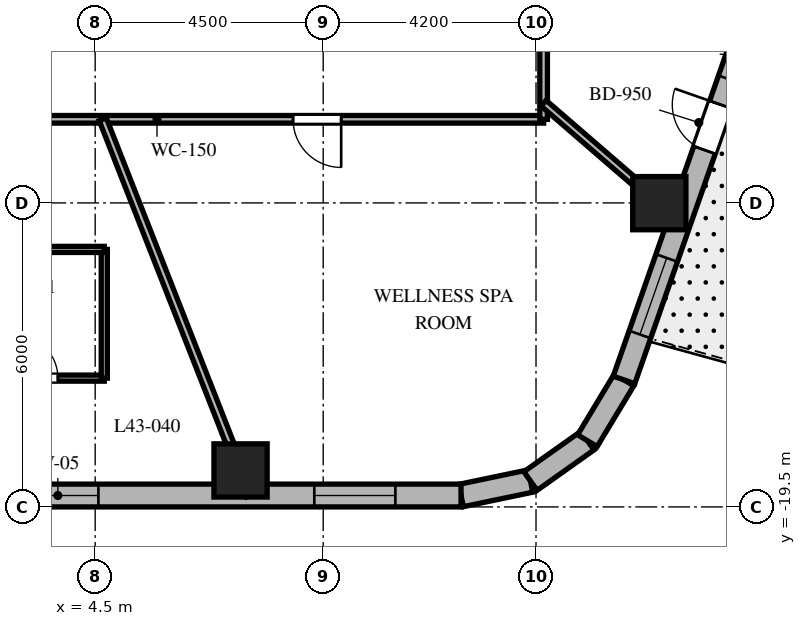
"""IFC4 building model, lengths in metres.
Left out: names, types, materials, properties, quantities, classifications, styles, units other than length and angle.
Written with IfcOpenShell. Run it as: python <this file> out.ifc"""

import sys

from ifc_helpers import new_model, si_unit, direction, frame, frame_2d, origin, origin_2d, place, context, subcontext, project, spatial, rectangle, extrude, element, fill, save


model = new_model("IFC4")
c1 = context("Model", 3, precision=1e-05, world=origin(), true_north=direction((0.0, 1.0)))
c2 = subcontext(c1, "Body", "Model", "MODEL_VIEW")
j1 = project(units=[si_unit("LENGTHUNIT", "METRE"), si_unit("PLANEANGLEUNIT", "RADIAN")], contexts=[c1])
p1 = place(None, origin())
s1 = spatial("IfcSite", under=j1, at=p1, CompositionType="ELEMENT")
p2 = place(p1, origin())
s2 = spatial("IfcBuilding", under=s1, at=p2, CompositionType="ELEMENT")
p3 = place(p2, frame((0.0, 0.0, 175.6)))
s3 = spatial("IfcBuildingStorey", under=s2, at=p3, CompositionType="ELEMENT", Elevation=175.6)
for number, where, z_axis, x_axis in (
    (1, (7.369, -18.78, 0.0), (0.0, 0.0, 1.0), (1.0, 0.0, 0.0)),
    (2, (15.633, -13.505, 0.0), (0.0, 0.0, 1.0), (1.0, 0.0, 0.0)),
):
    element("IfcColumn", number, at=place(p3, frame(where, z_axis=z_axis, x_axis=x_axis)), inside=s3, PredefinedType="COLUMN", context=c2, shape_type="SweptSolid", body=[
        extrude(rectangle(XDim=1.05, YDim=1.05, at=origin_2d()), origin(), (0.0, 0.0, 1.0), 3.7),
    ])
p4 = place(p3, frame((11.72, -19.275, 0.0), z_axis=(0.0, 0.0, 1.0), x_axis=(0.97893106758, 0.204191001093, 0.0)))
e3 = element("IfcWall", 3, at=p4, inside=s3, PredefinedType="SOLIDWALL", context=c2, shape_type="SweptSolid", body=[
    extrude(rectangle(XDim=1.4, YDim=0.45, at=frame_2d((0.7, 0.0))), origin(), (0.0, 0.0, 1.0), 3.4),
])
p5 = place(p3, frame((13.091, -18.989, 0.0), z_axis=(0.0, 0.0, 1.0), x_axis=(0.815574637848, 0.578651890258, 0.0)))
e4 = element("IfcWall", 4, at=p5, inside=s3, PredefinedType="SOLIDWALL", context=c2, shape_type="SweptSolid", body=[
    extrude(rectangle(XDim=1.377, YDim=0.45, at=frame_2d((0.688, 0.0))), origin(), (0.0, 0.0, 1.0), 3.4),
])
p6 = place(p3, frame((14.214, -18.192, 0.0), z_axis=(0.0, 0.0, 1.0), x_axis=(0.516340945502, 0.856383108193, 0.0)))
e5 = element("IfcWall", 5, at=p6, inside=s3, PredefinedType="SOLIDWALL", context=c2, shape_type="SweptSolid", body=[
    extrude(rectangle(XDim=1.4, YDim=0.45, at=frame_2d((0.7, 0.0))), origin(), (0.0, 0.0, 1.0), 3.4),
])
p7 = place(p3, frame((-10.108, -19.275, 0.0), z_axis=(0.0, 0.0, 1.0), x_axis=(1.0, 0.0, 0.0)))
e6 = element("IfcWall", 6, at=p7, inside=s3, PredefinedType="SOLIDWALL", context=c2, shape_type="SweptSolid", body=[
    extrude(rectangle(XDim=21.829, YDim=0.45, at=frame_2d((10.915, 0.0))), origin(), (0.0, 0.0, 1.0), 3.4),
])
p8 = place(p7, frame((1.297, 0.0, 0.8)))
e7 = element("IfcOpeningElement", 7, at=p8, cuts=e6, PredefinedType="OPENING", context=c2, shape_type="SweptSolid", body=[
    extrude(rectangle(XDim=1.6, YDim=1.75, at=frame_2d((0.8, 0.875))), frame((0.0, 0.235, 0.0), z_axis=(0.0, -1.0, 0.0), x_axis=(1.0, 0.0, 0.0)), (0.0, 0.0, 1.0), 0.47),
])
p9 = place(p7, frame((7.09, 0.0, 0.8)))
e8 = element("IfcOpeningElement", 8, at=p9, cuts=e6, PredefinedType="OPENING", context=c2, shape_type="SweptSolid", body=[
    extrude(rectangle(XDim=1.6, YDim=1.75, at=frame_2d((0.8, 0.875))), frame((0.0, 0.235, 0.0), z_axis=(0.0, -1.0, 0.0), x_axis=(1.0, 0.0, 0.0)), (0.0, 0.0, 1.0), 0.47),
])
p10 = place(p7, frame((13.072, 0.0, 0.8)))
e9 = element("IfcOpeningElement", 9, at=p10, cuts=e6, PredefinedType="OPENING", context=c2, shape_type="SweptSolid", body=[
    extrude(rectangle(XDim=1.6, YDim=1.75, at=frame_2d((0.8, 0.875))), frame((0.0, 0.235, 0.0), z_axis=(0.0, -1.0, 0.0), x_axis=(1.0, 0.0, 0.0)), (0.0, 0.0, 1.0), 0.47),
])
p11 = place(p7, frame((18.933, 0.0, 0.8)))
e10 = element("IfcOpeningElement", 10, at=p11, cuts=e6, PredefinedType="OPENING", context=c2, shape_type="SweptSolid", body=[
    extrude(rectangle(XDim=1.6, YDim=1.75, at=frame_2d((0.8, 0.875))), frame((0.0, 0.235, 0.0), z_axis=(0.0, -1.0, 0.0), x_axis=(1.0, 0.0, 0.0)), (0.0, 0.0, 1.0), 0.47),
])
p12 = place(p3, frame((14.937, -16.993, 0.0), z_axis=(0.0, 0.0, 1.0), x_axis=(0.330431575061, 0.943829949834, 0.0)))
e11 = element("IfcWall", 11, at=p12, inside=s3, PredefinedType="SOLIDWALL", context=c2, shape_type="SweptSolid", body=[
    extrude(rectangle(XDim=17.689, YDim=0.45, at=frame_2d((8.844, 0.0))), origin(), (0.0, 0.0, 1.0), 3.4),
])
p13 = place(p12, frame((4.807, 0.0, 0.0)))
e12 = element("IfcOpeningElement", 12, at=p13, cuts=e11, PredefinedType="OPENING", context=c2, shape_type="SweptSolid", body=[
    extrude(rectangle(XDim=0.95, YDim=2.15, at=frame_2d((0.475, 1.075))), frame((0.0, 0.235, 0.0), z_axis=(0.0, -1.0, 0.0), x_axis=(1.0, 0.0, 0.0)), (0.0, 0.0, 1.0), 0.47),
])
p14 = place(p12, frame((0.95, 0.0, 0.8)))
e13 = element("IfcOpeningElement", 13, at=p14, cuts=e11, PredefinedType="OPENING", context=c2, shape_type="SweptSolid", body=[
    extrude(rectangle(XDim=1.6, YDim=1.75, at=frame_2d((0.8, 0.875))), frame((0.0, 0.235, 0.0), z_axis=(0.0, -1.0, 0.0), x_axis=(1.0, 0.0, 0.0)), (0.0, 0.0, 1.0), 0.47),
])
p15 = place(p12, frame((6.286, 0.0, 0.8)))
e14 = element("IfcOpeningElement", 14, at=p15, cuts=e11, PredefinedType="OPENING", context=c2, shape_type="SweptSolid", body=[
    extrude(rectangle(XDim=1.0, YDim=1.65, at=frame_2d((0.5, 0.825))), frame((0.0, 0.235, 0.0), z_axis=(0.0, -1.0, 0.0), x_axis=(1.0, 0.0, 0.0)), (0.0, 0.0, 1.0), 0.47),
])
p16 = place(p12, frame((10.21, 0.0, 0.8)))
e15 = element("IfcOpeningElement", 15, at=p16, cuts=e11, PredefinedType="OPENING", context=c2, shape_type="SweptSolid", body=[
    extrude(rectangle(XDim=1.6, YDim=1.75, at=frame_2d((0.8, 0.875))), frame((0.0, 0.235, 0.0), z_axis=(0.0, -1.0, 0.0), x_axis=(1.0, 0.0, 0.0)), (0.0, 0.0, 1.0), 0.47),
])
p17 = place(p12, frame((15.084, 0.0, 0.8)))
e16 = element("IfcOpeningElement", 16, at=p17, cuts=e11, PredefinedType="OPENING", context=c2, shape_type="SweptSolid", body=[
    extrude(rectangle(XDim=1.6, YDim=1.75, at=frame_2d((0.8, 0.875))), frame((0.0, 0.235, 0.0), z_axis=(0.0, -1.0, 0.0), x_axis=(1.0, 0.0, 0.0)), (0.0, 0.0, 1.0), 0.47),
])
p18 = place(p3, frame((13.35, -11.85, 0.0), z_axis=(0.0, 0.0, 1.0), x_axis=(-1.0, 0.0, 0.0)))
e17 = element("IfcWall", 17, at=p18, inside=s3, PredefinedType="PARTITIONING", context=c2, shape_type="SweptSolid", body=[
    extrude(rectangle(XDim=26.7, YDim=0.15, at=frame_2d((13.35, 0.0))), origin(), (0.0, 0.0, 1.0), 2.84),
])
p19 = place(p18, frame((22.7, 0.0, 0.0)))
e18 = element("IfcOpeningElement", 18, at=p19, cuts=e17, PredefinedType="OPENING", context=c2, shape_type="SweptSolid", body=[
    extrude(rectangle(XDim=0.9, YDim=2.03, at=frame_2d((0.45, 1.015))), frame((0.0, 0.085, 0.0), z_axis=(0.0, -1.0, 0.0), x_axis=(1.0, 0.0, 0.0)), (0.0, 0.0, 1.0), 0.17),
])
p20 = place(p18, frame((18.523, 0.0, 0.0)))
e19 = element("IfcOpeningElement", 19, at=p20, cuts=e17, PredefinedType="OPENING", context=c2, shape_type="SweptSolid", body=[
    extrude(rectangle(XDim=0.95, YDim=2.03, at=frame_2d((0.475, 1.015))), frame((0.0, 0.085, 0.0), z_axis=(0.0, -1.0, 0.0), x_axis=(1.0, 0.0, 0.0)), (0.0, 0.0, 1.0), 0.17),
])
p21 = place(p18, frame((14.469, 0.0, 0.0)))
e20 = element("IfcOpeningElement", 20, at=p21, cuts=e17, PredefinedType="OPENING", context=c2, shape_type="SweptSolid", body=[
    extrude(rectangle(XDim=0.95, YDim=2.03, at=frame_2d((0.475, 1.015))), frame((0.0, 0.085, 0.0), z_axis=(0.0, -1.0, 0.0), x_axis=(1.0, 0.0, 0.0)), (0.0, 0.0, 1.0), 0.17),
])
p22 = place(p18, frame((10.314, 0.0, 0.0)))
e21 = element("IfcOpeningElement", 21, at=p22, cuts=e17, PredefinedType="OPENING", context=c2, shape_type="SweptSolid", body=[
    extrude(rectangle(XDim=0.95, YDim=2.03, at=frame_2d((0.475, 1.015))), frame((0.0, 0.085, 0.0), z_axis=(0.0, -1.0, 0.0), x_axis=(1.0, 0.0, 0.0)), (0.0, 0.0, 1.0), 0.17),
])
p23 = place(p18, frame((3.995, 0.0, 0.0)))
e22 = element("IfcOpeningElement", 22, at=p23, cuts=e17, PredefinedType="OPENING", context=c2, shape_type="SweptSolid", body=[
    extrude(rectangle(XDim=0.95, YDim=2.03, at=frame_2d((0.475, 1.015))), frame((0.0, 0.085, 0.0), z_axis=(0.0, -1.0, 0.0), x_axis=(1.0, 0.0, 0.0)), (0.0, 0.0, 1.0), 0.17),
])
p24 = place(p3, frame((13.35, 11.85, 0.0), z_axis=(0.0, 0.0, 1.0), x_axis=(0.0, -1.0, 0.0)))
e23 = element("IfcWall", 23, at=p24, inside=s3, PredefinedType="PARTITIONING", context=c2, shape_type="SweptSolid", body=[
    extrude(rectangle(XDim=23.7, YDim=0.15, at=frame_2d((11.85, 0.0))), origin(), (0.0, 0.0, 1.0), 2.84),
])
p25 = place(p24, frame((9.27, 0.0, 0.0)))
e24 = element("IfcOpeningElement", 24, at=p25, cuts=e23, PredefinedType="OPENING", context=c2, shape_type="SweptSolid", body=[
    extrude(rectangle(XDim=0.9, YDim=2.03, at=frame_2d((0.45, 1.015))), frame((0.0, 0.085, 0.0), z_axis=(0.0, -1.0, 0.0), x_axis=(1.0, 0.0, 0.0)), (0.0, 0.0, 1.0), 0.17),
])
p26 = place(p24, frame((3.765, 0.0, 0.0)))
e25 = element("IfcOpeningElement", 25, at=p26, cuts=e23, PredefinedType="OPENING", context=c2, shape_type="SweptSolid", body=[
    extrude(rectangle(XDim=0.9, YDim=2.03, at=frame_2d((0.45, 1.015))), frame((0.0, 0.085, 0.0), z_axis=(0.0, -1.0, 0.0), x_axis=(1.0, 0.0, 0.0)), (0.0, 0.0, 1.0), 0.17),
])
p27 = place(p24, frame((20.662, 0.0, 0.0)))
e26 = element("IfcOpeningElement", 26, at=p27, cuts=e23, PredefinedType="OPENING", context=c2, shape_type="SweptSolid", body=[
    extrude(rectangle(XDim=0.9, YDim=2.03, at=frame_2d((0.45, 1.015))), frame((0.0, 0.085, 0.0), z_axis=(0.0, -1.0, 0.0), x_axis=(1.0, 0.0, 0.0)), (0.0, 0.0, 1.0), 0.17),
])
p28 = place(p24, frame((16.055, 0.0, 0.0)))
e27 = element("IfcOpeningElement", 27, at=p28, cuts=e23, PredefinedType="OPENING", context=c2, shape_type="SweptSolid", body=[
    extrude(rectangle(XDim=0.95, YDim=2.03, at=frame_2d((0.475, 1.015))), frame((0.0, 0.085, 0.0), z_axis=(0.0, -1.0, 0.0), x_axis=(1.0, 0.0, 0.0)), (0.0, 0.0, 1.0), 0.17),
])
p29 = place(p24, frame((12.315, 0.0, 0.0)))
e28 = element("IfcOpeningElement", 28, at=p29, cuts=e23, PredefinedType="OPENING", context=c2, shape_type="SweptSolid", body=[
    extrude(rectangle(XDim=0.9, YDim=2.03, at=frame_2d((0.45, 1.015))), frame((0.0, 0.085, 0.0), z_axis=(0.0, -1.0, 0.0), x_axis=(1.0, 0.0, 0.0)), (0.0, 0.0, 1.0), 0.17),
])
p30 = place(p3, frame((4.65, -11.85, 0.0), z_axis=(0.0, 0.0, 1.0), x_axis=(0.365265947993, -0.930903210456, 0.0)))
e29 = element("IfcWall", 29, at=p30, inside=s3, PredefinedType="PARTITIONING", context=c2, shape_type="SweptSolid", body=[
    extrude(rectangle(XDim=7.976, YDim=0.15, at=frame_2d((3.988, 0.0))), origin(), (0.0, 0.0, 1.0), 2.64),
])
p31 = place(p3, frame((13.35, -11.533, 0.0), z_axis=(0.0, 0.0, 1.0), x_axis=(0.756711647314, -0.65374879183, 0.0)))
e30 = element("IfcWall", 30, at=p31, inside=s3, PredefinedType="PARTITIONING", context=c2, shape_type="SweptSolid", body=[
    extrude(rectangle(XDim=3.55, YDim=0.15, at=frame_2d((1.775, 0.0))), origin(), (0.0, 0.0, 1.0), 2.64),
])
p32 = place(p3, frame((2.0, -16.958, 0.0), z_axis=(0.0, 0.0, 1.0), x_axis=(1.0, 0.0, 0.0)))
e31 = element("IfcWall", 31, at=p32, inside=s3, PredefinedType="PARTITIONING", context=c2, shape_type="SweptSolid", body=[
    extrude(rectangle(XDim=2.68, YDim=0.12, at=frame_2d((1.34, 0.0))), origin(), (0.0, 0.0, 1.0), 3.4),
])
p33 = place(p32, frame((0.915, 0.0, 0.0)))
e32 = element("IfcOpeningElement", 32, at=p33, cuts=e31, PredefinedType="OPENING", context=c2, shape_type="SweptSolid", body=[
    extrude(rectangle(XDim=0.85, YDim=2.03, at=frame_2d((0.425, 1.015))), frame((0.0, 0.07, 0.0), z_axis=(0.0, -1.0, 0.0), x_axis=(1.0, 0.0, 0.0)), (0.0, 0.0, 1.0), 0.14),
])
p34 = place(p3, frame((4.68, -16.958, 0.0), z_axis=(0.0, 0.0, 1.0), x_axis=(0.0, 1.0, 0.0)))
e33 = element("IfcWall", 33, at=p34, inside=s3, PredefinedType="PARTITIONING", context=c2, shape_type="SweptSolid", body=[
    extrude(rectangle(XDim=2.54, YDim=0.12, at=frame_2d((1.27, 0.0))), origin(), (0.0, 0.0, 1.0), 2.84),
])
p35 = place(p3, frame((4.68, -14.418, 0.0), z_axis=(0.0, 0.0, 1.0), x_axis=(-1.0, 0.0, 0.0)))
e34 = element("IfcWall", 34, at=p35, inside=s3, PredefinedType="PARTITIONING", context=c2, shape_type="SweptSolid", body=[
    extrude(rectangle(XDim=2.68, YDim=0.12, at=frame_2d((1.34, 0.0))), origin(), (0.0, 0.0, 1.0), 3.4),
])
p36 = place(p10, origin())
e35 = element("IfcWindow", 35, at=p36, inside=s3, PartitioningType="SINGLE_PANEL", PredefinedType="WINDOW", context=c2, shape_type="SweptSolid", body=[
    extrude(rectangle(XDim=1.6, YDim=1.75, at=frame_2d((0.8, 0.875))), frame((0.0, 0.03, 0.0), z_axis=(0.0, -1.0, 0.0), x_axis=(1.0, 0.0, 0.0)), (0.0, 0.0, 1.0), 0.06),
])
fill(e9, e35)
p37 = place(p11, origin())
e36 = element("IfcWindow", 36, at=p37, inside=s3, PartitioningType="SINGLE_PANEL", PredefinedType="WINDOW", context=c2, shape_type="SweptSolid", body=[
    extrude(rectangle(XDim=1.6, YDim=1.75, at=frame_2d((0.8, 0.875))), frame((0.0, 0.03, 0.0), z_axis=(0.0, -1.0, 0.0), x_axis=(1.0, 0.0, 0.0)), (0.0, 0.0, 1.0), 0.06),
])
fill(e10, e36)
p38 = place(p13, origin())
e37 = element("IfcDoor", 37, at=p38, inside=s3, OperationType="SINGLE_SWING_RIGHT", PredefinedType="DOOR", context=c2, shape_type="SweptSolid", body=[
    extrude(rectangle(XDim=0.95, YDim=2.15, at=frame_2d((0.475, 1.075))), frame((0.0, 0.025, 0.0), z_axis=(0.0, -1.0, 0.0), x_axis=(1.0, 0.0, 0.0)), (0.0, 0.0, 1.0), 0.05),
])
fill(e12, e37)
p39 = place(p14, origin())
e38 = element("IfcWindow", 38, at=p39, inside=s3, PartitioningType="SINGLE_PANEL", PredefinedType="WINDOW", context=c2, shape_type="SweptSolid", body=[
    extrude(rectangle(XDim=1.6, YDim=1.75, at=frame_2d((0.8, 0.875))), frame((0.0, 0.03, 0.0), z_axis=(0.0, -1.0, 0.0), x_axis=(1.0, 0.0, 0.0)), (0.0, 0.0, 1.0), 0.06),
])
fill(e13, e38)
p40 = place(p33, origin())
e39 = element("IfcDoor", 39, at=p40, inside=s3, OperationType="SINGLE_SWING_LEFT", PredefinedType="DOOR", context=c2, shape_type="SweptSolid", body=[
    extrude(rectangle(XDim=0.85, YDim=2.03, at=frame_2d((0.425, 1.015))), frame((0.0, 0.025, 0.0), z_axis=(0.0, -1.0, 0.0), x_axis=(1.0, 0.0, 0.0)), (0.0, 0.0, 1.0), 0.05),
])
fill(e32, e39)
p41 = place(p23, origin())
e40 = element("IfcDoor", 40, at=p41, inside=s3, OperationType="SINGLE_SWING_LEFT", PredefinedType="DOOR", context=c2, shape_type="SweptSolid", body=[
    extrude(rectangle(XDim=0.95, YDim=2.03, at=frame_2d((0.475, 1.015))), frame((0.0, 0.025, 0.0), z_axis=(0.0, -1.0, 0.0), x_axis=(1.0, 0.0, 0.0)), (0.0, 0.0, 1.0), 0.05),
])
fill(e22, e40)
save(model, sys.argv[1])
